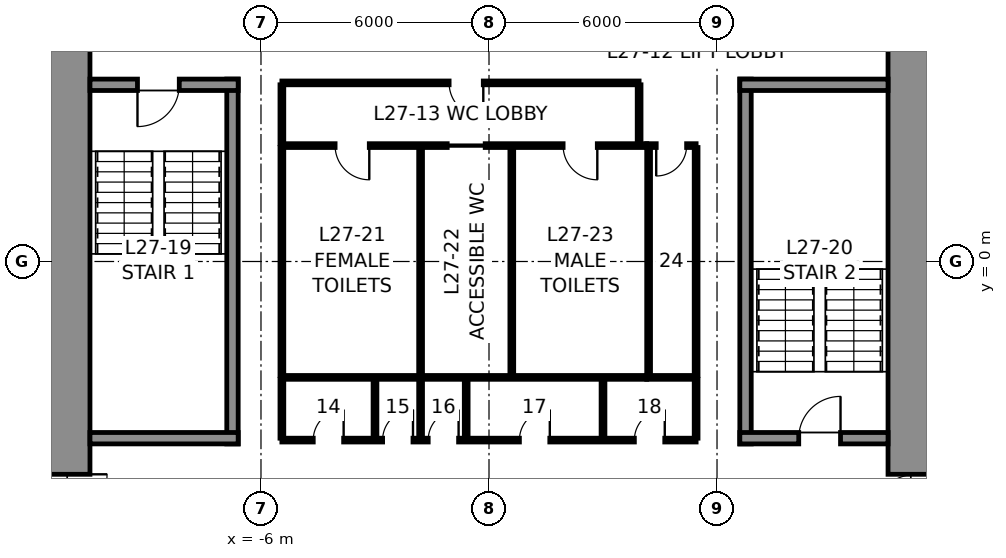
"""IFC4 building model, lengths in metres.
Left out: names, types, materials, properties, quantities, classifications, styles, units other than length and angle.
Written with IfcOpenShell. Run it as: python <this file> out.ifc"""

import sys

from ifc_helpers import new_model, si_unit, direction, frame, frame_2d, origin, place, context, subcontext, project, spatial, rectangle, extrude, element, fill, save


model = new_model("IFC4")
c1 = context("Model", 3, precision=1e-05, world=origin(), true_north=direction((0.0, 1.0)))
c2 = subcontext(c1, "Body", "Model", "MODEL_VIEW")
j1 = project(units=[si_unit("LENGTHUNIT", "METRE"), si_unit("PLANEANGLEUNIT", "RADIAN")], contexts=[c1])
p1 = place(None, origin())
s1 = spatial("IfcSite", under=j1, at=p1, CompositionType="ELEMENT")
p2 = place(p1, origin())
s2 = spatial("IfcBuilding", under=s1, at=p2, CompositionType="ELEMENT")
p3 = place(p2, frame((0.0, 0.0, 135.8)))
s3 = spatial("IfcBuildingStorey", under=s2, at=p3, CompositionType="ELEMENT", Elevation=135.8)
p4 = place(p3, frame((11.25, 10.5, 0.0), z_axis=(0.0, 0.0, 1.0), x_axis=(0.0, -1.0, 0.0)))
e1 = element("IfcWall", 1, at=p4, inside=s3, PredefinedType="SHEAR", context=c2, shape_type="SweptSolid", body=[
    extrude(rectangle(XDim=21.0, YDim=1.5, at=frame_2d((10.5, 0.0))), origin(), (0.0, 0.0, 1.0), 4.0),
])
p5 = place(p4, frame((3.7, 0.0, 0.0)))
e2 = element("IfcOpeningElement", 2, at=p5, cuts=e1, PredefinedType="OPENING", context=c2, shape_type="SweptSolid", body=[
    extrude(rectangle(XDim=1.2, YDim=2.3, at=frame_2d((0.6, 1.15))), frame((0.0, 0.76, 0.0), z_axis=(0.0, -1.0, 0.0), x_axis=(1.0, 0.0, 0.0)), (0.0, 0.0, 1.0), 1.52),
])
p6 = place(p4, frame((16.1, 0.0, 0.0)))
e3 = element("IfcOpeningElement", 3, at=p6, cuts=e1, PredefinedType="OPENING", context=c2, shape_type="SweptSolid", body=[
    extrude(rectangle(XDim=1.2, YDim=2.3, at=frame_2d((0.6, 1.15))), frame((0.0, 0.76, 0.0), z_axis=(0.0, -1.0, 0.0), x_axis=(1.0, 0.0, 0.0)), (0.0, 0.0, 1.0), 1.52),
])
p7 = place(p3, frame((-11.25, -10.5, 0.0), z_axis=(0.0, 0.0, 1.0), x_axis=(0.0, 1.0, 0.0)))
e4 = element("IfcWall", 4, at=p7, inside=s3, PredefinedType="SHEAR", context=c2, shape_type="SweptSolid", body=[
    extrude(rectangle(XDim=21.0, YDim=1.5, at=frame_2d((10.5, 0.0))), origin(), (0.0, 0.0, 1.0), 4.0),
])
p8 = place(p7, frame((16.1, 0.0, 0.0)))
e5 = element("IfcOpeningElement", 5, at=p8, cuts=e4, PredefinedType="OPENING", context=c2, shape_type="SweptSolid", body=[
    extrude(rectangle(XDim=1.2, YDim=2.3, at=frame_2d((0.6, 1.15))), frame((0.0, 0.76, 0.0), z_axis=(0.0, -1.0, 0.0), x_axis=(1.0, 0.0, 0.0)), (0.0, 0.0, 1.0), 1.52),
])
p9 = place(p7, frame((3.7, 0.0, 0.0)))
e6 = element("IfcOpeningElement", 6, at=p9, cuts=e4, PredefinedType="OPENING", context=c2, shape_type="SweptSolid", body=[
    extrude(rectangle(XDim=1.2, YDim=2.3, at=frame_2d((0.6, 1.15))), frame((0.0, 0.76, 0.0), z_axis=(0.0, -1.0, 0.0), x_axis=(1.0, 0.0, 0.0)), (0.0, 0.0, 1.0), 1.52),
])
p10 = place(p3, frame((-6.75, -4.8, 0.0), z_axis=(0.0, 0.0, 1.0), x_axis=(0.0, 1.0, 0.0)))
e7 = element("IfcWall", 7, at=p10, inside=s3, PredefinedType="SOLIDWALL", context=c2, shape_type="SweptSolid", body=[
    extrude(rectangle(XDim=9.6, YDim=0.3, at=frame_2d((4.8, 0.0))), origin(), (0.0, 0.0, 1.0), 3.75),
])
p11 = place(p3, frame((-10.5, 4.65, 0.0), z_axis=(0.0, 0.0, 1.0), x_axis=(1.0, 0.0, 0.0)))
e8 = element("IfcWall", 8, at=p11, inside=s3, PredefinedType="SOLIDWALL", context=c2, shape_type="SweptSolid", body=[
    extrude(rectangle(XDim=3.9, YDim=0.3, at=frame_2d((1.95, 0.0))), origin(), (0.0, 0.0, 1.0), 3.75),
])
p12 = place(p11, frame((1.25, 0.0, 0.0)))
e9 = element("IfcOpeningElement", 9, at=p12, cuts=e8, PredefinedType="OPENING", context=c2, shape_type="SweptSolid", body=[
    extrude(rectangle(XDim=1.1, YDim=2.3, at=frame_2d((0.55, 1.15))), frame((0.0, 0.16, 0.0), z_axis=(0.0, -1.0, 0.0), x_axis=(1.0, 0.0, 0.0)), (0.0, 0.0, 1.0), 0.32),
])
p13 = place(p3, frame((-6.6, -4.65, 0.0), z_axis=(0.0, 0.0, 1.0), x_axis=(-1.0, 0.0, 0.0)))
e10 = element("IfcWall", 10, at=p13, inside=s3, PredefinedType="SOLIDWALL", context=c2, shape_type="SweptSolid", body=[
    extrude(rectangle(XDim=3.9, YDim=0.3, at=frame_2d((1.95, 0.0))), origin(), (0.0, 0.0, 1.0), 3.75),
])
p14 = place(p3, frame((6.75, -4.8, 0.0), z_axis=(0.0, 0.0, 1.0), x_axis=(0.0, 1.0, 0.0)))
e11 = element("IfcWall", 11, at=p14, inside=s3, PredefinedType="SOLIDWALL", context=c2, shape_type="SweptSolid", body=[
    extrude(rectangle(XDim=9.6, YDim=0.3, at=frame_2d((4.8, 0.0))), origin(), (0.0, 0.0, 1.0), 3.75),
])
p15 = place(p3, frame((6.6, 4.65, 0.0), z_axis=(0.0, 0.0, 1.0), x_axis=(1.0, 0.0, 0.0)))
e12 = element("IfcWall", 12, at=p15, inside=s3, PredefinedType="SOLIDWALL", context=c2, shape_type="SweptSolid", body=[
    extrude(rectangle(XDim=3.9, YDim=0.3, at=frame_2d((1.95, 0.0))), origin(), (0.0, 0.0, 1.0), 3.75),
])
p16 = place(p3, frame((10.5, -4.65, 0.0), z_axis=(0.0, 0.0, 1.0), x_axis=(-1.0, 0.0, 0.0)))
e13 = element("IfcWall", 13, at=p16, inside=s3, PredefinedType="SOLIDWALL", context=c2, shape_type="SweptSolid", body=[
    extrude(rectangle(XDim=3.9, YDim=0.3, at=frame_2d((1.95, 0.0))), origin(), (0.0, 0.0, 1.0), 3.75),
])
p17 = place(p16, frame((1.25, 0.0, 0.0)))
e14 = element("IfcOpeningElement", 14, at=p17, cuts=e13, PredefinedType="OPENING", context=c2, shape_type="SweptSolid", body=[
    extrude(rectangle(XDim=1.1, YDim=2.3, at=frame_2d((0.55, 1.15))), frame((0.0, 0.16, 0.0), z_axis=(0.0, -1.0, 0.0), x_axis=(1.0, 0.0, 0.0)), (0.0, 0.0, 1.0), 0.32),
])
p18 = place(p3, frame((-5.45, 3.05, 0.0), z_axis=(0.0, 0.0, 1.0), x_axis=(1.0, 0.0, 0.0)))
e15 = element("IfcWall", 15, at=p18, inside=s3, PredefinedType="PARTITIONING", context=c2, shape_type="SweptSolid", body=[
    extrude(rectangle(XDim=9.6, YDim=0.1, at=frame_2d((4.8, 0.0))), origin(), (0.0, 0.0, 1.0), 3.75),
])
p19 = place(p18, frame((1.4, 0.0, 0.0)))
e16 = element("IfcOpeningElement", 16, at=p19, cuts=e15, PredefinedType="OPENING", context=c2, shape_type="SweptSolid", body=[
    extrude(rectangle(XDim=0.9, YDim=2.3, at=frame_2d((0.45, 1.15))), frame((0.0, 0.06, 0.0), z_axis=(0.0, -1.0, 0.0), x_axis=(1.0, 0.0, 0.0)), (0.0, 0.0, 1.0), 0.12),
])
p20 = place(p18, frame((4.35, 0.0, 0.0)))
e17 = element("IfcOpeningElement", 17, at=p20, cuts=e15, PredefinedType="OPENING", context=c2, shape_type="SweptSolid", body=[
    extrude(rectangle(XDim=1.0, YDim=2.3, at=frame_2d((0.5, 1.15))), frame((0.0, 0.06, 0.0), z_axis=(0.0, -1.0, 0.0), x_axis=(1.0, 0.0, 0.0)), (0.0, 0.0, 1.0), 0.12),
])
p21 = place(p18, frame((7.4, 0.0, 0.0)))
e18 = element("IfcOpeningElement", 18, at=p21, cuts=e15, PredefinedType="OPENING", context=c2, shape_type="SweptSolid", body=[
    extrude(rectangle(XDim=0.9, YDim=2.3, at=frame_2d((0.45, 1.15))), frame((0.0, 0.06, 0.0), z_axis=(0.0, -1.0, 0.0), x_axis=(1.0, 0.0, 0.0)), (0.0, 0.0, 1.0), 0.12),
])
p22 = place(p3, frame((4.15, 3.05, 0.0), z_axis=(0.0, 0.0, 1.0), x_axis=(1.0, 0.0, 0.0)))
e19 = element("IfcWall", 19, at=p22, inside=s3, PredefinedType="PARTITIONING", context=c2, shape_type="SweptSolid", body=[
    extrude(rectangle(XDim=1.3, YDim=0.1, at=frame_2d((0.65, 0.0))), origin(), (0.0, 0.0, 1.0), 3.75),
])
p23 = place(p22, frame((0.25, 0.0, 0.0)))
e20 = element("IfcOpeningElement", 20, at=p23, cuts=e19, PredefinedType="OPENING", context=c2, shape_type="SweptSolid", body=[
    extrude(rectangle(XDim=0.8, YDim=2.3, at=frame_2d((0.4, 1.15))), frame((0.0, 0.06, 0.0), z_axis=(0.0, -1.0, 0.0), x_axis=(1.0, 0.0, 0.0)), (0.0, 0.0, 1.0), 0.12),
])
p24 = place(p3, frame((4.15, -3.05, 0.0), z_axis=(0.0, 0.0, 1.0), x_axis=(-1.0, 0.0, 0.0)))
e21 = element("IfcWall", 21, at=p24, inside=s3, PredefinedType="PARTITIONING", context=c2, shape_type="SweptSolid", body=[
    extrude(rectangle(XDim=9.6, YDim=0.1, at=frame_2d((4.8, 0.0))), origin(), (0.0, 0.0, 1.0), 3.75),
])
p25 = place(p3, frame((5.45, -3.05, 0.0), z_axis=(0.0, 0.0, 1.0), x_axis=(-1.0, 0.0, 0.0)))
e22 = element("IfcWall", 22, at=p25, inside=s3, PredefinedType="PARTITIONING", context=c2, shape_type="SweptSolid", body=[
    extrude(rectangle(XDim=1.3, YDim=0.1, at=frame_2d((0.65, 0.0))), origin(), (0.0, 0.0, 1.0), 3.75),
])
for number, where, z_axis, x_axis in (
    (23, (5.45, 3.0, 0.0), (0.0, 0.0, 1.0), (0.0, -1.0, 0.0)),
    (24, (-5.45, -3.0, 0.0), (0.0, 0.0, 1.0), (0.0, 1.0, 0.0)),
    (25, (-1.8, -3.0, 0.0), (0.0, 0.0, 1.0), (0.0, 1.0, 0.0)),
    (26, (0.6, -3.0, 0.0), (0.0, 0.0, 1.0), (0.0, 1.0, 0.0)),
    (27, (4.2, -3.0, 0.0), (0.0, 0.0, 1.0), (0.0, 1.0, 0.0)),
):
    element("IfcWall", number, at=place(p3, frame(where, z_axis=z_axis, x_axis=x_axis)), inside=s3, PredefinedType="PARTITIONING", context=c2, shape_type="SweptSolid", body=[
        extrude(rectangle(XDim=6.0, YDim=0.1, at=frame_2d((3.0, 0.0))), origin(), (0.0, 0.0, 1.0), 3.75),
    ])
p26 = place(p3, frame((-5.45, 4.7, 0.0), z_axis=(0.0, 0.0, 1.0), x_axis=(1.0, 0.0, 0.0)))
e28 = element("IfcWall", 28, at=p26, inside=s3, PredefinedType="PARTITIONING", context=c2, shape_type="SweptSolid", body=[
    extrude(rectangle(XDim=9.4, YDim=0.1, at=frame_2d((4.7, 0.0))), origin(), (0.0, 0.0, 1.0), 3.75),
])
p27 = place(p26, frame((4.4, 0.0, 0.0)))
e29 = element("IfcOpeningElement", 29, at=p27, cuts=e28, PredefinedType="OPENING", context=c2, shape_type="SweptSolid", body=[
    extrude(rectangle(XDim=0.9, YDim=2.3, at=frame_2d((0.45, 1.15))), frame((0.0, 0.06, 0.0), z_axis=(0.0, -1.0, 0.0), x_axis=(1.0, 0.0, 0.0)), (0.0, 0.0, 1.0), 0.12),
])
for number, where, z_axis, x_axis in (
    (30, (-5.45, 3.1, 0.0), (0.0, 0.0, 1.0), (0.0, 1.0, 0.0)),
    (31, (3.95, 3.1, 0.0), (0.0, 0.0, 1.0), (0.0, 1.0, 0.0)),
):
    element("IfcWall", number, at=place(p3, frame(where, z_axis=z_axis, x_axis=x_axis)), inside=s3, PredefinedType="PARTITIONING", context=c2, shape_type="SweptSolid", body=[
        extrude(rectangle(XDim=1.55, YDim=0.1, at=frame_2d((0.775, 0.0))), origin(), (0.0, 0.0, 1.0), 3.75),
    ])
p28 = place(p3, frame((5.45, -4.7, 0.0), z_axis=(0.0, 0.0, 1.0), x_axis=(-1.0, 0.0, 0.0)))
e32 = element("IfcWall", 32, at=p28, inside=s3, PredefinedType="PARTITIONING", context=c2, shape_type="SweptSolid", body=[
    extrude(rectangle(XDim=10.9, YDim=0.1, at=frame_2d((5.45, 0.0))), origin(), (0.0, 0.0, 1.0), 3.75),
])
p29 = place(p28, frame((9.275, 0.0, 0.0)))
e33 = element("IfcOpeningElement", 33, at=p29, cuts=e32, PredefinedType="OPENING", context=c2, shape_type="SweptSolid", body=[
    extrude(rectangle(XDim=0.8, YDim=2.3, at=frame_2d((0.4, 1.15))), frame((0.0, 0.06, 0.0), z_axis=(0.0, -1.0, 0.0), x_axis=(1.0, 0.0, 0.0)), (0.0, 0.0, 1.0), 0.12),
])
p30 = place(p28, frame((7.45, 0.0, 0.0)))
e34 = element("IfcOpeningElement", 34, at=p30, cuts=e32, PredefinedType="OPENING", context=c2, shape_type="SweptSolid", body=[
    extrude(rectangle(XDim=0.8, YDim=2.3, at=frame_2d((0.4, 1.15))), frame((0.0, 0.06, 0.0), z_axis=(0.0, -1.0, 0.0), x_axis=(1.0, 0.0, 0.0)), (0.0, 0.0, 1.0), 0.12),
])
p31 = place(p28, frame((6.25, 0.0, 0.0)))
e35 = element("IfcOpeningElement", 35, at=p31, cuts=e32, PredefinedType="OPENING", context=c2, shape_type="SweptSolid", body=[
    extrude(rectangle(XDim=0.8, YDim=2.3, at=frame_2d((0.4, 1.15))), frame((0.0, 0.06, 0.0), z_axis=(0.0, -1.0, 0.0), x_axis=(1.0, 0.0, 0.0)), (0.0, 0.0, 1.0), 0.12),
])
p32 = place(p28, frame((3.85, 0.0, 0.0)))
e36 = element("IfcOpeningElement", 36, at=p32, cuts=e32, PredefinedType="OPENING", context=c2, shape_type="SweptSolid", body=[
    extrude(rectangle(XDim=0.8, YDim=2.3, at=frame_2d((0.4, 1.15))), frame((0.0, 0.06, 0.0), z_axis=(0.0, -1.0, 0.0), x_axis=(1.0, 0.0, 0.0)), (0.0, 0.0, 1.0), 0.12),
])
p33 = place(p28, frame((0.825, 0.0, 0.0)))
e37 = element("IfcOpeningElement", 37, at=p33, cuts=e32, PredefinedType="OPENING", context=c2, shape_type="SweptSolid", body=[
    extrude(rectangle(XDim=0.8, YDim=2.3, at=frame_2d((0.4, 1.15))), frame((0.0, 0.06, 0.0), z_axis=(0.0, -1.0, 0.0), x_axis=(1.0, 0.0, 0.0)), (0.0, 0.0, 1.0), 0.12),
])
for number, where, z_axis, x_axis in (
    (38, (-5.45, -3.1, 0.0), (0.0, 0.0, 1.0), (0.0, -1.0, 0.0)),
    (39, (5.45, -3.1, 0.0), (0.0, 0.0, 1.0), (0.0, -1.0, 0.0)),
    (40, (-3.0, -3.1, 0.0), (0.0, 0.0, 1.0), (0.0, -1.0, 0.0)),
    (41, (-1.8, -3.1, 0.0), (0.0, 0.0, 1.0), (0.0, -1.0, 0.0)),
    (42, (-0.6, -3.1, 0.0), (0.0, 0.0, 1.0), (0.0, -1.0, 0.0)),
    (43, (3.0, -3.1, 0.0), (0.0, 0.0, 1.0), (0.0, -1.0, 0.0)),
):
    element("IfcWall", number, at=place(p3, frame(where, z_axis=z_axis, x_axis=x_axis)), inside=s3, PredefinedType="PARTITIONING", context=c2, shape_type="SweptSolid", body=[
        extrude(rectangle(XDim=1.55, YDim=0.1, at=frame_2d((0.775, 0.0))), origin(), (0.0, 0.0, 1.0), 3.75),
    ])
p34 = place(p12, frame((1.1, 0.0, 0.0), z_axis=(0.0, 0.0, 1.0), x_axis=(-1.0, 0.0, 0.0)))
e44 = element("IfcDoor", 44, at=p34, inside=s3, OperationType="SINGLE_SWING_RIGHT", PredefinedType="DOOR", context=c2, shape_type="SweptSolid", body=[
    extrude(rectangle(XDim=1.1, YDim=2.3, at=frame_2d((0.55, 1.15))), frame((0.0, 0.025, 0.0), z_axis=(0.0, -1.0, 0.0), x_axis=(1.0, 0.0, 0.0)), (0.0, 0.0, 1.0), 0.05),
])
fill(e9, e44)
p35 = place(p17, frame((1.1, 0.0, 0.0), z_axis=(0.0, 0.0, 1.0), x_axis=(-1.0, 0.0, 0.0)))
e45 = element("IfcDoor", 45, at=p35, inside=s3, OperationType="SINGLE_SWING_RIGHT", PredefinedType="DOOR", context=c2, shape_type="SweptSolid", body=[
    extrude(rectangle(XDim=1.1, YDim=2.3, at=frame_2d((0.55, 1.15))), frame((0.0, 0.025, 0.0), z_axis=(0.0, -1.0, 0.0), x_axis=(1.0, 0.0, 0.0)), (0.0, 0.0, 1.0), 0.05),
])
fill(e14, e45)
p36 = place(p19, frame((0.9, 0.0, 0.0), z_axis=(0.0, 0.0, 1.0), x_axis=(-1.0, 0.0, 0.0)))
e46 = element("IfcDoor", 46, at=p36, inside=s3, OperationType="SINGLE_SWING_LEFT", PredefinedType="DOOR", context=c2, shape_type="SweptSolid", body=[
    extrude(rectangle(XDim=0.9, YDim=2.3, at=frame_2d((0.45, 1.15))), frame((0.0, 0.025, 0.0), z_axis=(0.0, -1.0, 0.0), x_axis=(1.0, 0.0, 0.0)), (0.0, 0.0, 1.0), 0.05),
])
fill(e16, e46)
p37 = place(p20, frame((1.0, 0.0, 0.0), z_axis=(0.0, 0.0, 1.0), x_axis=(-1.0, 0.0, 0.0)))
e47 = element("IfcDoor", 47, at=p37, inside=s3, OperationType="SLIDING_TO_LEFT", PredefinedType="DOOR", context=c2, shape_type="SweptSolid", body=[
    extrude(rectangle(XDim=1.0, YDim=2.3, at=frame_2d((0.5, 1.15))), frame((0.0, 0.025, 0.0), z_axis=(0.0, -1.0, 0.0), x_axis=(1.0, 0.0, 0.0)), (0.0, 0.0, 1.0), 0.05),
])
fill(e17, e47)
p38 = place(p21, frame((0.9, 0.0, 0.0), z_axis=(0.0, 0.0, 1.0), x_axis=(-1.0, 0.0, 0.0)))
e48 = element("IfcDoor", 48, at=p38, inside=s3, OperationType="SINGLE_SWING_LEFT", PredefinedType="DOOR", context=c2, shape_type="SweptSolid", body=[
    extrude(rectangle(XDim=0.9, YDim=2.3, at=frame_2d((0.45, 1.15))), frame((0.0, 0.025, 0.0), z_axis=(0.0, -1.0, 0.0), x_axis=(1.0, 0.0, 0.0)), (0.0, 0.0, 1.0), 0.05),
])
fill(e18, e48)
p39 = place(p23, frame((0.8, 0.0, 0.0), z_axis=(0.0, 0.0, 1.0), x_axis=(-1.0, 0.0, 0.0)))
e49 = element("IfcDoor", 49, at=p39, inside=s3, OperationType="SINGLE_SWING_RIGHT", PredefinedType="DOOR", context=c2, shape_type="SweptSolid", body=[
    extrude(rectangle(XDim=0.8, YDim=2.3, at=frame_2d((0.4, 1.15))), frame((0.0, 0.025, 0.0), z_axis=(0.0, -1.0, 0.0), x_axis=(1.0, 0.0, 0.0)), (0.0, 0.0, 1.0), 0.05),
])
fill(e20, e49)
p40 = place(p27, frame((0.9, 0.0, 0.0), z_axis=(0.0, 0.0, 1.0), x_axis=(-1.0, 0.0, 0.0)))
e50 = element("IfcDoor", 50, at=p40, inside=s3, OperationType="SINGLE_SWING_LEFT", PredefinedType="DOOR", context=c2, shape_type="SweptSolid", body=[
    extrude(rectangle(XDim=0.9, YDim=2.3, at=frame_2d((0.45, 1.15))), frame((0.0, 0.025, 0.0), z_axis=(0.0, -1.0, 0.0), x_axis=(1.0, 0.0, 0.0)), (0.0, 0.0, 1.0), 0.05),
])
fill(e29, e50)
p41 = place(p29, frame((0.8, 0.0, 0.0), z_axis=(0.0, 0.0, 1.0), x_axis=(-1.0, 0.0, 0.0)))
e51 = element("IfcDoor", 51, at=p41, inside=s3, OperationType="SINGLE_SWING_RIGHT", PredefinedType="DOOR", context=c2, shape_type="SweptSolid", body=[
    extrude(rectangle(XDim=0.8, YDim=2.3, at=frame_2d((0.4, 1.15))), frame((0.0, 0.025, 0.0), z_axis=(0.0, -1.0, 0.0), x_axis=(1.0, 0.0, 0.0)), (0.0, 0.0, 1.0), 0.05),
])
fill(e33, e51)
p42 = place(p30, frame((0.8, 0.0, 0.0), z_axis=(0.0, 0.0, 1.0), x_axis=(-1.0, 0.0, 0.0)))
e52 = element("IfcDoor", 52, at=p42, inside=s3, OperationType="SINGLE_SWING_RIGHT", PredefinedType="DOOR", context=c2, shape_type="SweptSolid", body=[
    extrude(rectangle(XDim=0.8, YDim=2.3, at=frame_2d((0.4, 1.15))), frame((0.0, 0.025, 0.0), z_axis=(0.0, -1.0, 0.0), x_axis=(1.0, 0.0, 0.0)), (0.0, 0.0, 1.0), 0.05),
])
fill(e34, e52)
p43 = place(p31, frame((0.8, 0.0, 0.0), z_axis=(0.0, 0.0, 1.0), x_axis=(-1.0, 0.0, 0.0)))
e53 = element("IfcDoor", 53, at=p43, inside=s3, OperationType="SINGLE_SWING_RIGHT", PredefinedType="DOOR", context=c2, shape_type="SweptSolid", body=[
    extrude(rectangle(XDim=0.8, YDim=2.3, at=frame_2d((0.4, 1.15))), frame((0.0, 0.025, 0.0), z_axis=(0.0, -1.0, 0.0), x_axis=(1.0, 0.0, 0.0)), (0.0, 0.0, 1.0), 0.05),
])
fill(e35, e53)
p44 = place(p32, frame((0.8, 0.0, 0.0), z_axis=(0.0, 0.0, 1.0), x_axis=(-1.0, 0.0, 0.0)))
e54 = element("IfcDoor", 54, at=p44, inside=s3, OperationType="SINGLE_SWING_RIGHT", PredefinedType="DOOR", context=c2, shape_type="SweptSolid", body=[
    extrude(rectangle(XDim=0.8, YDim=2.3, at=frame_2d((0.4, 1.15))), frame((0.0, 0.025, 0.0), z_axis=(0.0, -1.0, 0.0), x_axis=(1.0, 0.0, 0.0)), (0.0, 0.0, 1.0), 0.05),
])
fill(e36, e54)
p45 = place(p33, frame((0.8, 0.0, 0.0), z_axis=(0.0, 0.0, 1.0), x_axis=(-1.0, 0.0, 0.0)))
e55 = element("IfcDoor", 55, at=p45, inside=s3, OperationType="SINGLE_SWING_RIGHT", PredefinedType="DOOR", context=c2, shape_type="SweptSolid", body=[
    extrude(rectangle(XDim=0.8, YDim=2.3, at=frame_2d((0.4, 1.15))), frame((0.0, 0.025, 0.0), z_axis=(0.0, -1.0, 0.0), x_axis=(1.0, 0.0, 0.0)), (0.0, 0.0, 1.0), 0.05),
])
fill(e37, e55)
p46 = place(p9, frame((1.2, 0.0, 0.0), z_axis=(0.0, 0.0, 1.0), x_axis=(-1.0, 0.0, 0.0)))
e56 = element("IfcDoor", 56, at=p46, inside=s3, OperationType="SINGLE_SWING_LEFT", PredefinedType="DOOR", context=c2, shape_type="SweptSolid", body=[
    extrude(rectangle(XDim=1.2, YDim=2.3, at=frame_2d((0.6, 1.15))), frame((0.0, 0.025, 0.0), z_axis=(0.0, -1.0, 0.0), x_axis=(1.0, 0.0, 0.0)), (0.0, 0.0, 1.0), 0.05),
])
fill(e6, e56)
p47 = place(p6, frame((1.2, 0.0, 0.0), z_axis=(0.0, 0.0, 1.0), x_axis=(-1.0, 0.0, 0.0)))
e57 = element("IfcDoor", 57, at=p47, inside=s3, OperationType="SINGLE_SWING_LEFT", PredefinedType="DOOR", context=c2, shape_type="SweptSolid", body=[
    extrude(rectangle(XDim=1.2, YDim=2.3, at=frame_2d((0.6, 1.15))), frame((0.0, 0.025, 0.0), z_axis=(0.0, -1.0, 0.0), x_axis=(1.0, 0.0, 0.0)), (0.0, 0.0, 1.0), 0.05),
])
fill(e3, e57)
save(model, sys.argv[1])
